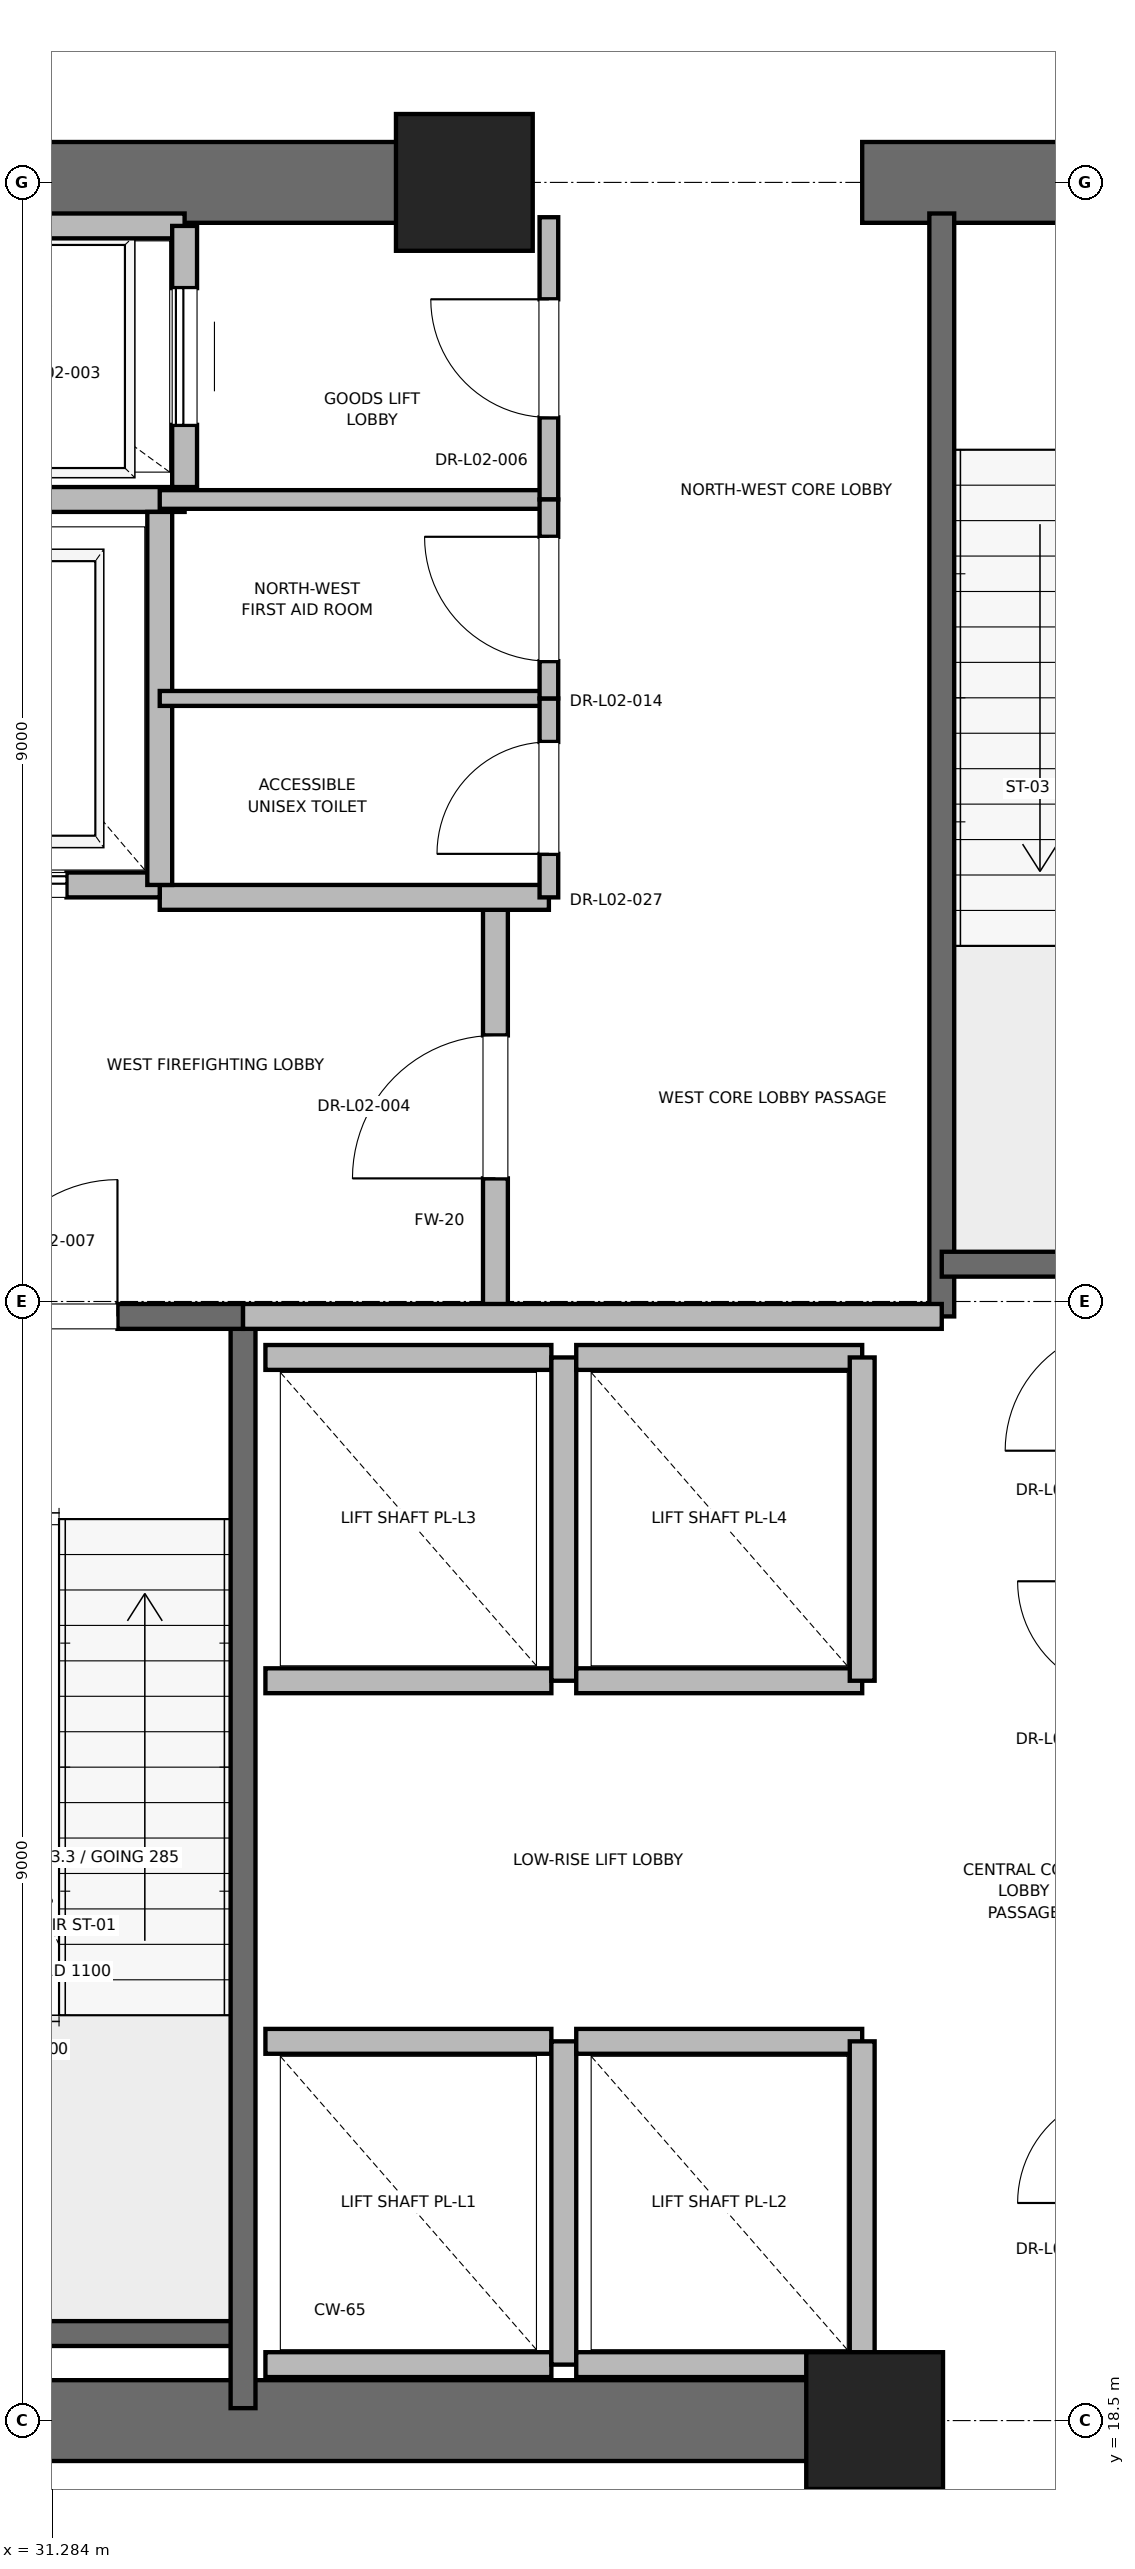
"""IFC4 building model, lengths in metres.
Left out: names, types, materials, properties, quantities, classifications, styles, units other than length and angle.
Written with IfcOpenShell. Run it as: python <this file> out.ifc"""

import sys

from ifc_helpers import new_model, si_unit, direction, frame, frame_2d, origin, origin_2d, place, context, subcontext, project, spatial, rectangle, extrude, element, fill, save


model = new_model("IFC4")
c1 = context("Model", 3, precision=1e-05, world=origin(), true_north=direction((0.0, 1.0)))
c2 = subcontext(c1, "Body", "Model", "MODEL_VIEW")
j1 = project(units=[si_unit("LENGTHUNIT", "METRE"), si_unit("PLANEANGLEUNIT", "RADIAN")], contexts=[c1])
p1 = place(None, origin())
s1 = spatial("IfcSite", under=j1, at=p1, CompositionType="ELEMENT")
p2 = place(p1, origin())
s2 = spatial("IfcBuilding", under=s1, at=p2, CompositionType="ELEMENT")
p3 = place(p2, frame((0.0, 0.0, 11.2)))
s3 = spatial("IfcBuildingStorey", under=s2, at=p3, CompositionType="ELEMENT", Elevation=11.2)
for number, where, z_axis, x_axis in (
    (1, (37.9, 18.5, 0.0), (0.0, 0.0, 1.0), (1.0, 0.0, 0.0)),
    (2, (34.6, 36.5, 0.0), (0.0, 0.0, 1.0), (1.0, 0.0, 0.0)),
):
    element("IfcColumn", number, at=place(p3, frame(where, z_axis=z_axis, x_axis=x_axis)), inside=s3, PredefinedType="PILASTER", context=c2, shape_type="SweptSolid", body=[
        extrude(rectangle(XDim=1.1, YDim=1.1, at=origin_2d()), origin(), (0.0, 0.0, 1.0), 5.2),
    ])
p4 = place(p3, frame((29.0, 18.5, 0.0), z_axis=(0.0, 0.0, 1.0), x_axis=(1.0, 0.0, 0.0)))
e3 = element("IfcWall", 3, at=p4, inside=s3, PredefinedType="SHEAR", context=c2, shape_type="SweptSolid", body=[
    extrude(rectangle(XDim=9.2, YDim=0.65, at=frame_2d((4.6, 0.0))), origin(), (0.0, 0.0, 1.0), 4.92),
])
p5 = place(p3, frame((29.0, 36.5, 0.0), z_axis=(0.0, 0.0, 1.0), x_axis=(1.0, 0.0, 0.0)))
e4 = element("IfcWall", 4, at=p5, inside=s3, PredefinedType="SHEAR", context=c2, shape_type="SweptSolid", body=[
    extrude(rectangle(XDim=5.8, YDim=0.65, at=frame_2d((2.9, 0.0))), origin(), (0.0, 0.0, 1.0), 4.92),
])
p6 = place(p3, frame((37.8, 36.5, 0.0), z_axis=(0.0, 0.0, 1.0), x_axis=(1.0, 0.0, 0.0)))
e5 = element("IfcWall", 5, at=p6, inside=s3, PredefinedType="SHEAR", context=c2, shape_type="SweptSolid", body=[
    extrude(rectangle(XDim=4.4, YDim=0.65, at=frame_2d((2.2, 0.0))), origin(), (0.0, 0.0, 1.0), 4.92),
])
p7 = place(p6, frame((1.65, 0.0, 0.0)))
e6 = element("IfcOpeningElement", 6, at=p7, cuts=e5, PredefinedType="OPENING", context=c2, shape_type="SweptSolid", body=[
    extrude(rectangle(XDim=1.1, YDim=2.15, at=frame_2d((0.55, 1.075))), frame((0.0, 0.325, 0.0), z_axis=(0.0, -1.0, 0.0), x_axis=(1.0, 0.0, 0.0)), (0.0, 0.0, 1.0), 0.65),
])
p8 = place(p3, frame((29.7, 19.2, 0.0), z_axis=(0.0, 0.0, 1.0), x_axis=(1.0, 0.0, 0.0)))
e7 = element("IfcWall", 7, at=p8, inside=s3, PredefinedType="SOLIDWALL", context=c2, shape_type="SweptSolid", body=[
    extrude(rectangle(XDim=3.12, YDim=0.2, at=frame_2d((1.56, 0.0))), origin(), (0.0, 0.0, 1.0), 4.92),
])
p9 = place(p3, frame((32.82, 18.6, 0.0), z_axis=(0.0, 0.0, 1.0), x_axis=(0.0, 1.0, 0.0)))
e8 = element("IfcWall", 8, at=p9, inside=s3, PredefinedType="SOLIDWALL", context=c2, shape_type="SweptSolid", body=[
    extrude(rectangle(XDim=8.78, YDim=0.2, at=frame_2d((4.39, 0.0))), origin(), (0.0, 0.0, 1.0), 4.92),
])
p10 = place(p3, frame((29.7, 27.38, 0.0), z_axis=(0.0, 0.0, 1.0), x_axis=(1.0, 0.0, 0.0)))
e9 = element("IfcWall", 9, at=p10, inside=s3, PredefinedType="SOLIDWALL", context=c2, shape_type="SweptSolid", body=[
    extrude(rectangle(XDim=3.12, YDim=0.2, at=frame_2d((1.56, 0.0))), origin(), (0.0, 0.0, 1.0), 4.92),
])
p11 = place(p10, frame((1.01, 0.0, 0.0)))
e10 = element("IfcOpeningElement", 10, at=p11, cuts=e9, PredefinedType="OPENING", context=c2, shape_type="SweptSolid", body=[
    extrude(rectangle(XDim=1.1, YDim=2.15, at=frame_2d((0.55, 1.075))), frame((0.0, 0.1, 0.0), z_axis=(0.0, -1.0, 0.0), x_axis=(1.0, 0.0, 0.0)), (0.0, 0.0, 1.0), 0.2),
])
p12 = place(p3, frame((38.44, 27.38, 0.0), z_axis=(0.0, 0.0, 1.0), x_axis=(0.0, 1.0, 0.0)))
e11 = element("IfcWall", 11, at=p12, inside=s3, PredefinedType="SOLIDWALL", context=c2, shape_type="SweptSolid", body=[
    extrude(rectangle(XDim=8.87, YDim=0.2, at=frame_2d((4.435, 0.0))), origin(), (0.0, 0.0, 1.0), 4.92),
])
p13 = place(p3, frame((38.44, 27.8, 0.0), z_axis=(0.0, 0.0, 1.0), x_axis=(1.0, 0.0, 0.0)))
e12 = element("IfcWall", 12, at=p13, inside=s3, PredefinedType="SOLIDWALL", context=c2, shape_type="SweptSolid", body=[
    extrude(rectangle(XDim=3.32, YDim=0.2, at=frame_2d((1.66, 0.0))), origin(), (0.0, 0.0, 1.0), 4.92),
])
p14 = place(p3, frame((34.85, 27.38, 0.0), z_axis=(0.0, 0.0, 1.0), x_axis=(0.0, 1.0, 0.0)))
e13 = element("IfcWall", 13, at=p14, inside=s3, PredefinedType="PARTITIONING", context=c2, shape_type="SweptSolid", body=[
    extrude(rectangle(XDim=3.37, YDim=0.2, at=frame_2d((1.685, 0.0))), origin(), (0.0, 0.0, 1.0), 4.92),
])
p15 = place(p14, frame((1.11, 0.0, 0.0)))
e14 = element("IfcOpeningElement", 14, at=p15, cuts=e13, PredefinedType="OPENING", context=c2, shape_type="SweptSolid", body=[
    extrude(rectangle(XDim=1.15, YDim=2.2, at=frame_2d((0.575, 1.1))), frame((0.0, 0.1, 0.0), z_axis=(0.0, -1.0, 0.0), x_axis=(1.0, 0.0, 0.0)), (0.0, 0.0, 1.0), 0.2),
])
p16 = place(p3, frame((32.82, 27.38, 0.0), z_axis=(0.0, 0.0, 1.0), x_axis=(1.0, 0.0, 0.0)))
e15 = element("IfcWall", 15, at=p16, inside=s3, PredefinedType="PARTITIONING", context=c2, shape_type="SweptSolid", body=[
    extrude(rectangle(XDim=5.62, YDim=0.2, at=frame_2d((2.81, 0.0))), origin(), (0.0, 0.0, 1.0), 4.92),
])
p17 = place(p3, frame((32.15, 30.75, 0.0), z_axis=(0.0, 0.0, 1.0), x_axis=(1.0, 0.0, 0.0)))
e16 = element("IfcWall", 16, at=p17, inside=s3, PredefinedType="PARTITIONING", context=c2, shape_type="SweptSolid", body=[
    extrude(rectangle(XDim=3.13, YDim=0.2, at=frame_2d((1.565, 0.0))), origin(), (0.0, 0.0, 1.0), 4.92),
])
p18 = place(p3, frame((29.55, 30.85, 0.0), z_axis=(0.0, 0.0, 1.0), x_axis=(1.0, 0.0, 0.0)))
e17 = element("IfcWall", 17, at=p18, inside=s3, PredefinedType="SOLIDWALL", context=c2, shape_type="SweptSolid", body=[
    extrude(rectangle(XDim=2.6, YDim=0.2, at=frame_2d((1.3, 0.0))), origin(), (0.0, 0.0, 1.0), 3.7),
])
p19 = place(p18, frame((0.75, 0.0, 0.0)))
e18 = element("IfcOpeningElement", 18, at=p19, cuts=e17, PredefinedType="OPENING", context=c2, shape_type="SweptSolid", body=[
    extrude(rectangle(XDim=1.1, YDim=2.2, at=frame_2d((0.55, 1.1))), frame((0.0, 0.1, 0.0), z_axis=(0.0, -1.0, 0.0), x_axis=(1.0, 0.0, 0.0)), (0.0, 0.0, 1.0), 0.2),
])
p20 = place(p3, frame((29.55, 33.95, 0.0), z_axis=(0.0, 0.0, 1.0), x_axis=(1.0, 0.0, 0.0)))
e19 = element("IfcWall", 19, at=p20, inside=s3, PredefinedType="SOLIDWALL", context=c2, shape_type="SweptSolid", body=[
    extrude(rectangle(XDim=2.8, YDim=0.2, at=frame_2d((1.4, 0.0))), origin(), (0.0, 0.0, 1.0), 4.92),
])
p21 = place(p3, frame((32.15, 30.85, 0.0), z_axis=(0.0, 0.0, 1.0), x_axis=(0.0, 1.0, 0.0)))
e20 = element("IfcWall", 20, at=p21, inside=s3, PredefinedType="SOLIDWALL", context=c2, shape_type="SweptSolid", body=[
    extrude(rectangle(XDim=3.0, YDim=0.2, at=frame_2d((1.5, 0.0))), origin(), (0.0, 0.0, 1.0), 4.92),
])
p22 = place(p3, frame((32.35, 36.15, 0.0), z_axis=(0.0, 0.0, 1.0), x_axis=(-1.0, 0.0, 0.0)))
e21 = element("IfcWall", 21, at=p22, inside=s3, PredefinedType="SOLIDWALL", context=c2, shape_type="SweptSolid", body=[
    extrude(rectangle(XDim=2.8, YDim=0.2, at=frame_2d((1.4, 0.0))), origin(), (0.0, 0.0, 1.0), 3.979),
])
p23 = place(p3, frame((32.35, 34.05, 0.0), z_axis=(0.0, 0.0, 1.0), x_axis=(0.0, 1.0, 0.0)))
e22 = element("IfcWall", 22, at=p23, inside=s3, PredefinedType="SOLIDWALL", context=c2, shape_type="SweptSolid", body=[
    extrude(rectangle(XDim=2.1, YDim=0.2, at=frame_2d((1.05, 0.0))), origin(), (0.0, 0.0, 1.0), 4.92),
])
p24 = place(p23, frame((0.5, 0.0, 0.0)))
e23 = element("IfcOpeningElement", 23, at=p24, cuts=e22, PredefinedType="OPENING", context=c2, shape_type="SweptSolid", body=[
    extrude(rectangle(XDim=1.1, YDim=2.2, at=frame_2d((0.55, 1.1))), frame((0.0, 0.1, 0.0), z_axis=(0.0, -1.0, 0.0), x_axis=(1.0, 0.0, 0.0)), (0.0, 0.0, 1.0), 0.2),
])
for number, where, z_axis, x_axis in (
    (24, (33.0, 18.95, 0.0), (0.0, 0.0, 1.0), (1.0, 0.0, 0.0)),
    (25, (35.3, 21.55, 0.0), (0.0, 0.0, 1.0), (-1.0, 0.0, 0.0)),
):
    element("IfcWall", number, at=place(p3, frame(where, z_axis=z_axis, x_axis=x_axis)), inside=s3, PredefinedType="SOLIDWALL", context=c2, shape_type="SweptSolid", body=[
        extrude(rectangle(XDim=2.3, YDim=0.2, at=frame_2d((1.15, 0.0))), origin(), (0.0, 0.0, 1.0), 4.92),
    ])
p25 = place(p3, frame((35.4, 18.95, 0.0), z_axis=(0.0, 0.0, 1.0), x_axis=(0.0, 1.0, 0.0)))
e26 = element("IfcWall", 26, at=p25, inside=s3, PredefinedType="SOLIDWALL", context=c2, shape_type="SweptSolid", body=[
    extrude(rectangle(XDim=2.6, YDim=0.2, at=frame_2d((1.3, 0.0))), origin(), (0.0, 0.0, 1.0), 4.92),
])
p26 = place(p3, frame((35.5, 18.95, 0.0), z_axis=(0.0, 0.0, 1.0), x_axis=(1.0, 0.0, 0.0)))
e27 = element("IfcWall", 27, at=p26, inside=s3, PredefinedType="SOLIDWALL", context=c2, shape_type="SweptSolid", body=[
    extrude(rectangle(XDim=2.3, YDim=0.2, at=frame_2d((1.15, 0.0))), origin(), (0.0, 0.0, 1.0), 3.7),
])
p27 = place(p3, frame((37.8, 21.55, 0.0), z_axis=(0.0, 0.0, 1.0), x_axis=(-1.0, 0.0, 0.0)))
e28 = element("IfcWall", 28, at=p27, inside=s3, PredefinedType="SOLIDWALL", context=c2, shape_type="SweptSolid", body=[
    extrude(rectangle(XDim=2.3, YDim=0.2, at=frame_2d((1.15, 0.0))), origin(), (0.0, 0.0, 1.0), 4.92),
])
p28 = place(p3, frame((37.8, 18.95, 0.0), z_axis=(0.0, 0.0, 1.0), x_axis=(0.0, 1.0, 0.0)))
e29 = element("IfcWall", 29, at=p28, inside=s3, PredefinedType="SOLIDWALL", context=c2, shape_type="SweptSolid", body=[
    extrude(rectangle(XDim=2.6, YDim=0.2, at=frame_2d((1.3, 0.0))), origin(), (0.0, 0.0, 1.0), 3.7),
])
for number, where, z_axis, x_axis in (
    (30, (33.0, 24.45, 0.0), (0.0, 0.0, 1.0), (1.0, 0.0, 0.0)),
    (31, (35.3, 27.05, 0.0), (0.0, 0.0, 1.0), (-1.0, 0.0, 0.0)),
):
    element("IfcWall", number, at=place(p3, frame(where, z_axis=z_axis, x_axis=x_axis)), inside=s3, PredefinedType="SOLIDWALL", context=c2, shape_type="SweptSolid", body=[
        extrude(rectangle(XDim=2.3, YDim=0.2, at=frame_2d((1.15, 0.0))), origin(), (0.0, 0.0, 1.0), 4.92),
    ])
p29 = place(p3, frame((35.4, 24.45, 0.0), z_axis=(0.0, 0.0, 1.0), x_axis=(0.0, 1.0, 0.0)))
e32 = element("IfcWall", 32, at=p29, inside=s3, PredefinedType="SOLIDWALL", context=c2, shape_type="SweptSolid", body=[
    extrude(rectangle(XDim=2.6, YDim=0.2, at=frame_2d((1.3, 0.0))), origin(), (0.0, 0.0, 1.0), 4.92),
])
for number, where, z_axis, x_axis in (
    (33, (35.5, 24.45, 0.0), (0.0, 0.0, 1.0), (1.0, 0.0, 0.0)),
    (34, (37.8, 27.05, 0.0), (0.0, 0.0, 1.0), (-1.0, 0.0, 0.0)),
):
    element("IfcWall", number, at=place(p3, frame(where, z_axis=z_axis, x_axis=x_axis)), inside=s3, PredefinedType="SOLIDWALL", context=c2, shape_type="SweptSolid", body=[
        extrude(rectangle(XDim=2.3, YDim=0.2, at=frame_2d((1.15, 0.0))), origin(), (0.0, 0.0, 1.0), 4.92),
    ])
p30 = place(p3, frame((37.8, 24.45, 0.0), z_axis=(0.0, 0.0, 1.0), x_axis=(0.0, 1.0, 0.0)))
e35 = element("IfcWall", 35, at=p30, inside=s3, PredefinedType="SOLIDWALL", context=c2, shape_type="SweptSolid", body=[
    extrude(rectangle(XDim=2.6, YDim=0.2, at=frame_2d((1.3, 0.0))), origin(), (0.0, 0.0, 1.0), 4.92),
])
p31 = place(p3, frame((32.15, 33.95, 0.0), z_axis=(0.0, 0.0, 1.0), x_axis=(1.0, 0.0, 0.0)))
e36 = element("IfcWall", 36, at=p31, inside=s3, PredefinedType="PARTITIONING", context=c2, shape_type="SweptSolid", body=[
    extrude(rectangle(XDim=3.13, YDim=0.15, at=frame_2d((1.565, 0.0))), origin(), (0.0, 0.0, 1.0), 2.85),
])
p32 = place(p3, frame((35.28, 33.95, 0.0), z_axis=(0.0, 0.0, 1.0), x_axis=(0.0, 1.0, 0.0)))
e37 = element("IfcWall", 37, at=p32, inside=s3, PredefinedType="PARTITIONING", context=c2, shape_type="SweptSolid", body=[
    extrude(rectangle(XDim=2.27, YDim=0.15, at=frame_2d((1.135, 0.0))), origin(), (0.0, 0.0, 1.0), 2.85),
])
p33 = place(p32, frame((0.66, 0.0, 0.0)))
e38 = element("IfcOpeningElement", 38, at=p33, cuts=e37, PredefinedType="OPENING", context=c2, shape_type="SweptSolid", body=[
    extrude(rectangle(XDim=0.95, YDim=2.15, at=frame_2d((0.475, 1.075))), frame((0.0, 0.075, 0.0), z_axis=(0.0, -1.0, 0.0), x_axis=(1.0, 0.0, 0.0)), (0.0, 0.0, 1.0), 0.15),
])
p34 = place(p3, frame((32.15, 32.35, 0.0), z_axis=(0.0, 0.0, 1.0), x_axis=(1.0, 0.0, 0.0)))
e39 = element("IfcWall", 39, at=p34, inside=s3, PredefinedType="PARTITIONING", context=c2, shape_type="SweptSolid", body=[
    extrude(rectangle(XDim=3.13, YDim=0.12, at=frame_2d((1.565, 0.0))), origin(), (0.0, 0.0, 1.0), 2.85),
])
p35 = place(p3, frame((35.28, 30.75, 0.0), z_axis=(0.0, 0.0, 1.0), x_axis=(0.0, 1.0, 0.0)))
e40 = element("IfcWall", 40, at=p35, inside=s3, PredefinedType="PARTITIONING", context=c2, shape_type="SweptSolid", body=[
    extrude(rectangle(XDim=1.6, YDim=0.15, at=frame_2d((0.8, 0.0))), origin(), (0.0, 0.0, 1.0), 2.85),
])
p36 = place(p35, frame((0.35, 0.0, 0.0)))
e41 = element("IfcOpeningElement", 41, at=p36, cuts=e40, PredefinedType="OPENING", context=c2, shape_type="SweptSolid", body=[
    extrude(rectangle(XDim=0.9, YDim=2.1, at=frame_2d((0.45, 1.05))), frame((0.0, 0.075, 0.0), z_axis=(0.0, -1.0, 0.0), x_axis=(1.0, 0.0, 0.0)), (0.0, 0.0, 1.0), 0.15),
])
p37 = place(p3, frame((35.28, 32.35, 0.0), z_axis=(0.0, 0.0, 1.0), x_axis=(0.0, 1.0, 0.0)))
e42 = element("IfcWall", 42, at=p37, inside=s3, PredefinedType="PARTITIONING", context=c2, shape_type="SweptSolid", body=[
    extrude(rectangle(XDim=1.6, YDim=0.15, at=frame_2d((0.8, 0.0))), origin(), (0.0, 0.0, 1.0), 2.85),
])
p38 = place(p37, frame((0.3, 0.0, 0.0)))
e43 = element("IfcOpeningElement", 43, at=p38, cuts=e42, PredefinedType="OPENING", context=c2, shape_type="SweptSolid", body=[
    extrude(rectangle(XDim=1.0, YDim=2.15, at=frame_2d((0.5, 1.075))), frame((0.0, 0.075, 0.0), z_axis=(0.0, -1.0, 0.0), x_axis=(1.0, 0.0, 0.0)), (0.0, 0.0, 1.0), 0.15),
])
p39 = place(p11, origin())
e44 = element("IfcDoor", 44, at=p39, inside=s3, OperationType="SINGLE_SWING_RIGHT", PredefinedType="DOOR", context=c2, shape_type="SweptSolid", body=[
    extrude(rectangle(XDim=1.1, YDim=2.15, at=frame_2d((0.55, 1.075))), frame((0.0, 0.025, 0.0), z_axis=(0.0, -1.0, 0.0), x_axis=(1.0, 0.0, 0.0)), (0.0, 0.0, 1.0), 0.05),
])
fill(e10, e44)
p40 = place(p15, origin())
e45 = element("IfcDoor", 45, at=p40, inside=s3, OperationType="SINGLE_SWING_LEFT", PredefinedType="DOOR", context=c2, shape_type="SweptSolid", body=[
    extrude(rectangle(XDim=1.15, YDim=2.2, at=frame_2d((0.575, 1.1))), frame((0.0, 0.025, 0.0), z_axis=(0.0, -1.0, 0.0), x_axis=(1.0, 0.0, 0.0)), (0.0, 0.0, 1.0), 0.05),
])
fill(e14, e45)
p41 = place(p19, origin())
e46 = element("IfcDoor", 46, at=p41, inside=s3, OperationType="SLIDING_TO_RIGHT", PredefinedType="DOOR", context=c2, shape_type="SweptSolid", body=[
    extrude(rectangle(XDim=1.1, YDim=2.2, at=frame_2d((0.55, 1.1))), frame((0.0, 0.025, 0.0), z_axis=(0.0, -1.0, 0.0), x_axis=(1.0, 0.0, 0.0)), (0.0, 0.0, 1.0), 0.05),
])
fill(e18, e46)
p42 = place(p24, origin())
e47 = element("IfcDoor", 47, at=p42, inside=s3, OperationType="SLIDING_TO_RIGHT", PredefinedType="DOOR", context=c2, shape_type="SweptSolid", body=[
    extrude(rectangle(XDim=1.1, YDim=2.2, at=frame_2d((0.55, 1.1))), frame((0.0, 0.025, 0.0), z_axis=(0.0, -1.0, 0.0), x_axis=(1.0, 0.0, 0.0)), (0.0, 0.0, 1.0), 0.05),
])
fill(e23, e47)
p43 = place(p33, origin())
e48 = element("IfcDoor", 48, at=p43, inside=s3, OperationType="SINGLE_SWING_RIGHT", PredefinedType="DOOR", context=c2, shape_type="SweptSolid", body=[
    extrude(rectangle(XDim=0.95, YDim=2.15, at=frame_2d((0.475, 1.075))), frame((0.0, 0.025, 0.0), z_axis=(0.0, -1.0, 0.0), x_axis=(1.0, 0.0, 0.0)), (0.0, 0.0, 1.0), 0.05),
])
fill(e38, e48)
p44 = place(p36, origin())
e49 = element("IfcDoor", 49, at=p44, inside=s3, OperationType="SINGLE_SWING_LEFT", PredefinedType="DOOR", context=c2, shape_type="SweptSolid", body=[
    extrude(rectangle(XDim=0.9, YDim=2.1, at=frame_2d((0.45, 1.05))), frame((0.0, 0.025, 0.0), z_axis=(0.0, -1.0, 0.0), x_axis=(1.0, 0.0, 0.0)), (0.0, 0.0, 1.0), 0.05),
])
fill(e41, e49)
p45 = place(p38, origin())
e50 = element("IfcDoor", 50, at=p45, inside=s3, OperationType="SINGLE_SWING_RIGHT", PredefinedType="DOOR", context=c2, shape_type="SweptSolid", body=[
    extrude(rectangle(XDim=1.0, YDim=2.15, at=frame_2d((0.5, 1.075))), frame((0.0, 0.025, 0.0), z_axis=(0.0, -1.0, 0.0), x_axis=(1.0, 0.0, 0.0)), (0.0, 0.0, 1.0), 0.05),
])
fill(e43, e50)
save(model, sys.argv[1])
